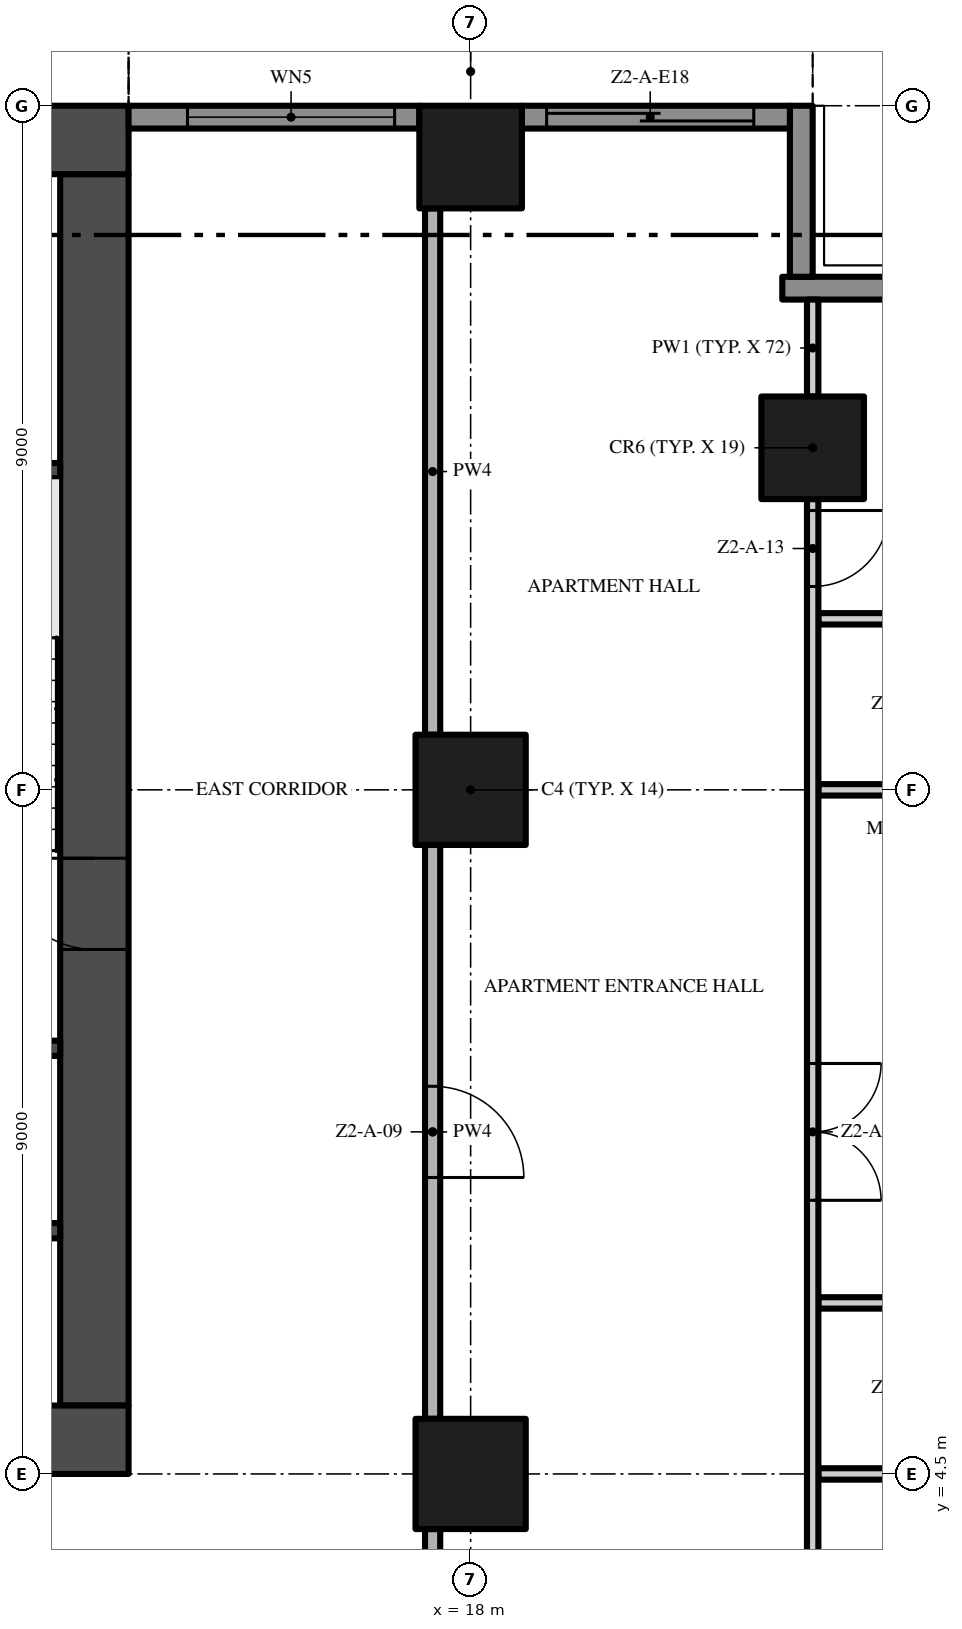
"""IFC4 building model, lengths in metres.
Left out: names, types, materials, properties, quantities, classifications, styles, units other than length and angle.
Written with IfcOpenShell. Run it as: python <this file> out.ifc"""

import sys

from ifc_helpers import new_model, si_unit, direction, frame, frame_2d, origin, origin_2d, place, context, subcontext, project, spatial, rectangle, extrude, element, fill, save


model = new_model("IFC4")
c1 = context("Model", 3, precision=1e-05, world=origin(), true_north=direction((0.0, 1.0)))
c2 = subcontext(c1, "Body", "Model", "MODEL_VIEW")
j1 = project(units=[si_unit("LENGTHUNIT", "METRE"), si_unit("PLANEANGLEUNIT", "RADIAN")], contexts=[c1])
p1 = place(None, origin())
s1 = spatial("IfcSite", under=j1, at=p1, CompositionType="ELEMENT")
p2 = place(p1, origin())
s2 = spatial("IfcBuilding", under=s1, at=p2, CompositionType="ELEMENT")
p3 = place(p2, frame((0.0, 0.0, 77.0)))
s3 = spatial("IfcBuildingStorey", under=s2, at=p3, CompositionType="ELEMENT", Elevation=77.0)
p4 = place(p3, frame((-13.5, 4.95, -0.3), z_axis=(0.0, 0.0, 1.0), x_axis=(1.0, 0.0, 0.0)))
e1 = element("IfcWall", 1, at=p4, inside=s3, PredefinedType="SHEAR", context=c2, shape_type="SweptSolid", body=[
    extrude(rectangle(XDim=27.0, YDim=0.9, at=frame_2d((13.5, 0.0))), origin(), (0.0, 0.0, 1.0), 3.8),
])
p5 = place(p4, frame((12.0, 0.0, 0.3)))
e2 = element("IfcOpeningElement", 2, at=p5, cuts=e1, PredefinedType="OPENING", context=c2, shape_type="SweptSolid", body=[
    extrude(rectangle(XDim=3.0, YDim=2.4, at=frame_2d((1.5, 1.2))), frame((0.0, 0.46, 0.0), z_axis=(0.0, -1.0, 0.0), x_axis=(1.0, 0.0, 0.0)), (0.0, 0.0, 1.0), 0.92),
])
p6 = place(p4, frame((4.9, 0.0, 0.3)))
e3 = element("IfcOpeningElement", 3, at=p6, cuts=e1, PredefinedType="OPENING", context=c2, shape_type="SweptSolid", body=[
    extrude(rectangle(XDim=1.2, YDim=2.2, at=frame_2d((0.6, 1.1))), frame((0.0, 0.46, 0.0), z_axis=(0.0, -1.0, 0.0), x_axis=(1.0, 0.0, 0.0)), (0.0, 0.0, 1.0), 0.92),
])
p7 = place(p4, frame((20.75, 0.0, 0.3)))
e4 = element("IfcOpeningElement", 4, at=p7, cuts=e1, PredefinedType="OPENING", context=c2, shape_type="SweptSolid", body=[
    extrude(rectangle(XDim=1.5, YDim=2.2, at=frame_2d((0.75, 1.1))), frame((0.0, 0.46, 0.0), z_axis=(0.0, -1.0, 0.0), x_axis=(1.0, 0.0, 0.0)), (0.0, 0.0, 1.0), 0.92),
])
p8 = place(p4, frame((17.4, 0.0, 0.3)))
e5 = element("IfcOpeningElement", 5, at=p8, cuts=e1, PredefinedType="OPENING", context=c2, shape_type="SweptSolid", body=[
    extrude(rectangle(XDim=1.2, YDim=2.2, at=frame_2d((0.6, 1.1))), frame((0.0, 0.46, 0.0), z_axis=(0.0, -1.0, 0.0), x_axis=(1.0, 0.0, 0.0)), (0.0, 0.0, 1.0), 0.92),
])
p9 = place(p3, frame((13.05, 5.4, -0.3), z_axis=(0.0, 0.0, 1.0), x_axis=(0.0, 1.0, 0.0)))
e6 = element("IfcWall", 6, at=p9, inside=s3, PredefinedType="SHEAR", context=c2, shape_type="SweptSolid", body=[
    extrude(rectangle(XDim=16.2, YDim=0.9, at=frame_2d((8.1, 0.0))), origin(), (0.0, 0.0, 1.0), 3.8),
])
p10 = place(p9, frame((6.0, 0.0, 0.3)))
e7 = element("IfcOpeningElement", 7, at=p10, cuts=e6, PredefinedType="OPENING", context=c2, shape_type="SweptSolid", body=[
    extrude(rectangle(XDim=1.2, YDim=2.2, at=frame_2d((0.6, 1.1))), frame((0.0, 0.46, 0.0), z_axis=(0.0, -1.0, 0.0), x_axis=(1.0, 0.0, 0.0)), (0.0, 0.0, 1.0), 0.92),
])
p11 = place(p3, frame((13.5, 22.05, -0.3), z_axis=(0.0, 0.0, 1.0), x_axis=(-1.0, 0.0, 0.0)))
e8 = element("IfcWall", 8, at=p11, inside=s3, PredefinedType="SHEAR", context=c2, shape_type="SweptSolid", body=[
    extrude(rectangle(XDim=27.0, YDim=0.9, at=frame_2d((13.5, 0.0))), origin(), (0.0, 0.0, 1.0), 3.8),
])
p12 = place(p3, frame((18.0, 13.5, 0.0), z_axis=(0.0, 0.0, 1.0), x_axis=(1.0, 0.0, 0.0)))
e9 = element("IfcColumn", 9, at=p12, inside=s3, PredefinedType="COLUMN", context=c2, shape_type="SweptSolid", body=[
    extrude(rectangle(XDim=1.45, YDim=1.45, at=origin_2d()), origin(), (0.0, 0.0, 1.0), 3.5),
])
p13 = place(p3, frame((18.0, 21.825, 0.0), z_axis=(0.0, 0.0, 1.0), x_axis=(1.0, 0.0, 0.0)))
e10 = element("IfcColumn", 10, at=p13, inside=s3, PredefinedType="COLUMN", context=c2, shape_type="SweptSolid", body=[
    extrude(rectangle(XDim=1.35, YDim=1.35, at=origin_2d()), origin(), (0.0, 0.0, 1.0), 3.5),
])
p14 = place(p3, frame((18.0, 4.5, 0.0), z_axis=(0.0, 0.0, 1.0), x_axis=(1.0, 0.0, 0.0)))
e11 = element("IfcColumn", 11, at=p14, inside=s3, PredefinedType="COLUMN", context=c2, shape_type="SweptSolid", body=[
    extrude(rectangle(XDim=1.45, YDim=1.45, at=origin_2d()), origin(), (0.0, 0.0, 1.0), 3.5),
])
p15 = place(p3, frame((22.5, 18.0, 0.0), z_axis=(0.0, 0.0, 1.0), x_axis=(1.0, 0.0, 0.0)))
e12 = element("IfcColumn", 12, at=p15, inside=s3, PredefinedType="COLUMN", context=c2, shape_type="SweptSolid", body=[
    extrude(rectangle(XDim=1.35, YDim=1.35, at=origin_2d()), origin(), (0.0, 0.0, 1.0), 3.5),
])
p16 = place(p3, frame((22.1, 20.1, 0.0), z_axis=(0.0, 0.0, 1.0), x_axis=(1.0, 0.0, 0.0)))
e13 = element("IfcWall", 13, at=p16, inside=s3, PredefinedType="SOLIDWALL", context=c2, shape_type="SweptSolid", body=[
    extrude(rectangle(XDim=2.35, YDim=0.3, at=frame_2d((1.175, 0.0))), origin(), (0.0, 0.0, 1.0), 3.5),
])
p17 = place(p3, frame((22.35, 22.5, 0.0), z_axis=(0.0, 0.0, 1.0), x_axis=(0.0, -1.0, 0.0)))
e14 = element("IfcWall", 14, at=p17, inside=s3, PredefinedType="SOLIDWALL", context=c2, shape_type="SweptSolid", body=[
    extrude(rectangle(XDim=2.25, YDim=0.3, at=frame_2d((1.125, 0.0))), origin(), (0.0, 0.0, 1.0), 3.5),
])
p18 = place(p3, frame((18.675, 22.35, 0.0), z_axis=(0.0, 0.0, 1.0), x_axis=(1.0, 0.0, 0.0)))
e15 = element("IfcWall", 15, at=p18, inside=s3, PredefinedType="SOLIDWALL", context=c2, shape_type="SweptSolid", body=[
    extrude(rectangle(XDim=3.525, YDim=0.3, at=frame_2d((1.762, 0.0))), origin(), (0.0, 0.0, 1.0), 3.5),
])
p19 = place(p18, frame((0.325, 0.0, 0.0)))
e16 = element("IfcOpeningElement", 16, at=p19, cuts=e15, PredefinedType="OPENING", context=c2, shape_type="SweptSolid", body=[
    extrude(rectangle(XDim=2.725, YDim=2.4, at=frame_2d((1.363, 1.2))), frame((0.0, 0.16, 0.0), z_axis=(0.0, -1.0, 0.0), x_axis=(1.0, 0.0, 0.0)), (0.0, 0.0, 1.0), 0.32),
])
p20 = place(p3, frame((13.5, 22.35, 0.0), z_axis=(0.0, 0.0, 1.0), x_axis=(1.0, 0.0, 0.0)))
e17 = element("IfcWall", 17, at=p20, inside=s3, PredefinedType="SOLIDWALL", context=c2, shape_type="SweptSolid", body=[
    extrude(rectangle(XDim=3.825, YDim=0.3, at=frame_2d((1.913, 0.0))), origin(), (0.0, 0.0, 1.0), 3.5),
])
p21 = place(p20, frame((0.775, 0.0, 0.45)))
e18 = element("IfcOpeningElement", 18, at=p21, cuts=e17, PredefinedType="OPENING", context=c2, shape_type="SweptSolid", body=[
    extrude(rectangle(XDim=2.725, YDim=2.65, at=frame_2d((1.363, 1.325))), frame((0.0, 0.16, 0.0), z_axis=(0.0, -1.0, 0.0), x_axis=(1.0, 0.0, 0.0)), (0.0, 0.0, 1.0), 0.32),
])
for number, where, z_axis, x_axis in (
    (19, (9.65, 7.7, 0.0), (0.0, 0.0, 1.0), (1.0, 0.0, 0.0)),
    (20, (9.65, 10.1, 0.0), (0.0, 0.0, 1.0), (1.0, 0.0, 0.0)),
    (21, (9.65, 17.7, 0.0), (0.0, 0.0, 1.0), (1.0, 0.0, 0.0)),
):
    element("IfcWall", number, at=place(p3, frame(where, z_axis=z_axis, x_axis=x_axis)), inside=s3, PredefinedType="SHEAR", context=c2, shape_type="SweptSolid", body=[
        extrude(rectangle(XDim=2.95, YDim=0.2, at=frame_2d((1.475, 0.0))), origin(), (0.0, 0.0, 1.0), 3.5),
    ])
p22 = place(p3, frame((22.575, 4.5, 0.0), z_axis=(0.0, 0.0, 1.0), x_axis=(1.0, 0.0, 0.0)))
e22 = element("IfcWall", 22, at=p22, inside=s3, PredefinedType="PARTITIONING", context=c2, shape_type="SweptSolid", body=[
    extrude(rectangle(XDim=3.075, YDim=0.15, at=frame_2d((1.538, 0.0))), origin(), (0.0, 0.0, 1.0), 3.5),
])
p23 = place(p3, frame((22.575, 6.75, 0.0), z_axis=(0.0, 0.0, 1.0), x_axis=(1.0, 0.0, 0.0)))
e23 = element("IfcWall", 23, at=p23, inside=s3, PredefinedType="PARTITIONING", context=c2, shape_type="SweptSolid", body=[
    extrude(rectangle(XDim=1.875, YDim=0.15, at=frame_2d((0.938, 0.0))), origin(), (0.0, 0.0, 1.0), 3.5),
])
p24 = place(p3, frame((22.575, 13.5, 0.0), z_axis=(0.0, 0.0, 1.0), x_axis=(1.0, 0.0, 0.0)))
e24 = element("IfcWall", 24, at=p24, inside=s3, PredefinedType="PARTITIONING", context=c2, shape_type="SweptSolid", body=[
    extrude(rectangle(XDim=3.075, YDim=0.15, at=frame_2d((1.538, 0.0))), origin(), (0.0, 0.0, 1.0), 3.5),
])
p25 = place(p3, frame((22.575, 15.75, 0.0), z_axis=(0.0, 0.0, 1.0), x_axis=(1.0, 0.0, 0.0)))
e25 = element("IfcWall", 25, at=p25, inside=s3, PredefinedType="PARTITIONING", context=c2, shape_type="SweptSolid", body=[
    extrude(rectangle(XDim=1.875, YDim=0.15, at=frame_2d((0.938, 0.0))), origin(), (0.0, 0.0, 1.0), 3.5),
])
p26 = place(p3, frame((17.5, -0.2, 0.0), z_axis=(0.0, 0.0, 1.0), x_axis=(0.0, 1.0, 0.0)))
e26 = element("IfcWall", 26, at=p26, inside=s3, PredefinedType="PARTITIONING", context=c2, shape_type="SweptSolid", body=[
    extrude(rectangle(XDim=3.975, YDim=0.2, at=frame_2d((1.988, 0.0))), origin(), (0.0, 0.0, 1.0), 3.5),
])
p27 = place(p3, frame((17.5, 12.775, 0.0), z_axis=(0.0, 0.0, 1.0), x_axis=(0.0, -1.0, 0.0)))
e27 = element("IfcWall", 27, at=p27, inside=s3, PredefinedType="PARTITIONING", context=c2, shape_type="SweptSolid", body=[
    extrude(rectangle(XDim=7.55, YDim=0.2, at=frame_2d((3.775, 0.0))), origin(), (0.0, 0.0, 1.0), 3.5),
])
p28 = place(p27, frame((3.175, 0.0, 0.0)))
e28 = element("IfcOpeningElement", 28, at=p28, cuts=e27, PredefinedType="OPENING", context=c2, shape_type="SweptSolid", body=[
    extrude(rectangle(XDim=1.2, YDim=2.4, at=frame_2d((0.6, 1.2))), frame((0.0, 0.11, 0.0), z_axis=(0.0, -1.0, 0.0), x_axis=(1.0, 0.0, 0.0)), (0.0, 0.0, 1.0), 0.22),
])
p29 = place(p3, frame((17.5, 14.225, 0.0), z_axis=(0.0, 0.0, 1.0), x_axis=(0.0, 1.0, 0.0)))
e29 = element("IfcWall", 29, at=p29, inside=s3, PredefinedType="PARTITIONING", context=c2, shape_type="SweptSolid", body=[
    extrude(rectangle(XDim=6.925, YDim=0.2, at=frame_2d((3.462, 0.0))), origin(), (0.0, 0.0, 1.0), 3.5),
])
p30 = place(p3, frame((22.5, 17.325, 0.0), z_axis=(0.0, 0.0, 1.0), x_axis=(0.0, -1.0, 0.0)))
e30 = element("IfcWall", 30, at=p30, inside=s3, PredefinedType="PARTITIONING", context=c2, shape_type="SweptSolid", body=[
    extrude(rectangle(XDim=17.225, YDim=0.15, at=frame_2d((8.613, 0.0))), origin(), (0.0, 0.0, 1.0), 3.5),
])
p31 = place(p30, frame((14.575, 0.0, 0.0)))
e31 = element("IfcOpeningElement", 31, at=p31, cuts=e30, PredefinedType="OPENING", context=c2, shape_type="SweptSolid", body=[
    extrude(rectangle(XDim=1.0, YDim=2.4, at=frame_2d((0.5, 1.2))), frame((0.0, 0.085, 0.0), z_axis=(0.0, -1.0, 0.0), x_axis=(1.0, 0.0, 0.0)), (0.0, 0.0, 1.0), 0.17),
])
p32 = place(p30, frame((7.425, 0.0, 0.0)))
e32 = element("IfcOpeningElement", 32, at=p32, cuts=e30, PredefinedType="OPENING", context=c2, shape_type="SweptSolid", body=[
    extrude(rectangle(XDim=1.8, YDim=2.4, at=frame_2d((0.9, 1.2))), frame((0.0, 0.085, 0.0), z_axis=(0.0, -1.0, 0.0), x_axis=(1.0, 0.0, 0.0)), (0.0, 0.0, 1.0), 0.17),
])
p33 = place(p30, frame((0.15, 0.0, 0.0)))
e33 = element("IfcOpeningElement", 33, at=p33, cuts=e30, PredefinedType="OPENING", context=c2, shape_type="SweptSolid", body=[
    extrude(rectangle(XDim=1.0, YDim=2.4, at=frame_2d((0.5, 1.2))), frame((0.0, 0.085, 0.0), z_axis=(0.0, -1.0, 0.0), x_axis=(1.0, 0.0, 0.0)), (0.0, 0.0, 1.0), 0.17),
])
p34 = place(p3, frame((22.5, 18.675, 0.0), z_axis=(0.0, 0.0, 1.0), x_axis=(0.0, 1.0, 0.0)))
e34 = element("IfcWall", 34, at=p34, inside=s3, PredefinedType="PARTITIONING", context=c2, shape_type="SweptSolid", body=[
    extrude(rectangle(XDim=1.275, YDim=0.15, at=frame_2d((0.637, 0.0))), origin(), (0.0, 0.0, 1.0), 3.5),
])
p35 = place(p19, origin())
e35 = element("IfcDoor", 35, at=p35, inside=s3, OperationType="SINGLE_SWING_LEFT", PredefinedType="DOOR", context=c2, shape_type="SweptSolid", body=[
    extrude(rectangle(XDim=2.725, YDim=2.4, at=frame_2d((1.363, 1.2))), frame((0.0, 0.025, 0.0), z_axis=(0.0, -1.0, 0.0), x_axis=(1.0, 0.0, 0.0)), (0.0, 0.0, 1.0), 0.05),
])
fill(e16, e35)
p36 = place(p21, origin())
e36 = element("IfcWindow", 36, at=p36, inside=s3, PartitioningType="SINGLE_PANEL", PredefinedType="WINDOW", context=c2, shape_type="SweptSolid", body=[
    extrude(rectangle(XDim=2.725, YDim=2.65, at=frame_2d((1.363, 1.325))), frame((0.0, 0.03, 0.0), z_axis=(0.0, -1.0, 0.0), x_axis=(1.0, 0.0, 0.0)), (0.0, 0.0, 1.0), 0.06),
])
fill(e18, e36)
p37 = place(p10, frame((1.2, 0.0, 0.0), z_axis=(0.0, 0.0, 1.0), x_axis=(-1.0, 0.0, 0.0)))
e37 = element("IfcDoor", 37, at=p37, inside=s3, OperationType="SINGLE_SWING_LEFT", PredefinedType="DOOR", context=c2, shape_type="SweptSolid", body=[
    extrude(rectangle(XDim=1.2, YDim=2.2, at=frame_2d((0.6, 1.1))), frame((0.0, 0.025, 0.0), z_axis=(0.0, -1.0, 0.0), x_axis=(1.0, 0.0, 0.0)), (0.0, 0.0, 1.0), 0.05),
])
fill(e7, e37)
p38 = place(p28, origin())
e38 = element("IfcDoor", 38, at=p38, inside=s3, OperationType="SINGLE_SWING_RIGHT", PredefinedType="DOOR", context=c2, shape_type="SweptSolid", body=[
    extrude(rectangle(XDim=1.2, YDim=2.4, at=frame_2d((0.6, 1.2))), frame((0.0, 0.025, 0.0), z_axis=(0.0, -1.0, 0.0), x_axis=(1.0, 0.0, 0.0)), (0.0, 0.0, 1.0), 0.05),
])
fill(e28, e38)
p39 = place(p32, origin())
e39 = element("IfcDoor", 39, at=p39, inside=s3, OperationType="DOUBLE_DOOR_SINGLE_SWING", PredefinedType="DOOR", context=c2, shape_type="SweptSolid", body=[
    extrude(rectangle(XDim=1.8, YDim=2.4, at=frame_2d((0.9, 1.2))), frame((0.0, 0.025, 0.0), z_axis=(0.0, -1.0, 0.0), x_axis=(1.0, 0.0, 0.0)), (0.0, 0.0, 1.0), 0.05),
])
fill(e32, e39)
p40 = place(p33, origin())
e40 = element("IfcDoor", 40, at=p40, inside=s3, OperationType="SINGLE_SWING_LEFT", PredefinedType="DOOR", context=c2, shape_type="SweptSolid", body=[
    extrude(rectangle(XDim=1.0, YDim=2.4, at=frame_2d((0.5, 1.2))), frame((0.0, 0.025, 0.0), z_axis=(0.0, -1.0, 0.0), x_axis=(1.0, 0.0, 0.0)), (0.0, 0.0, 1.0), 0.05),
])
fill(e33, e40)
save(model, sys.argv[1])
